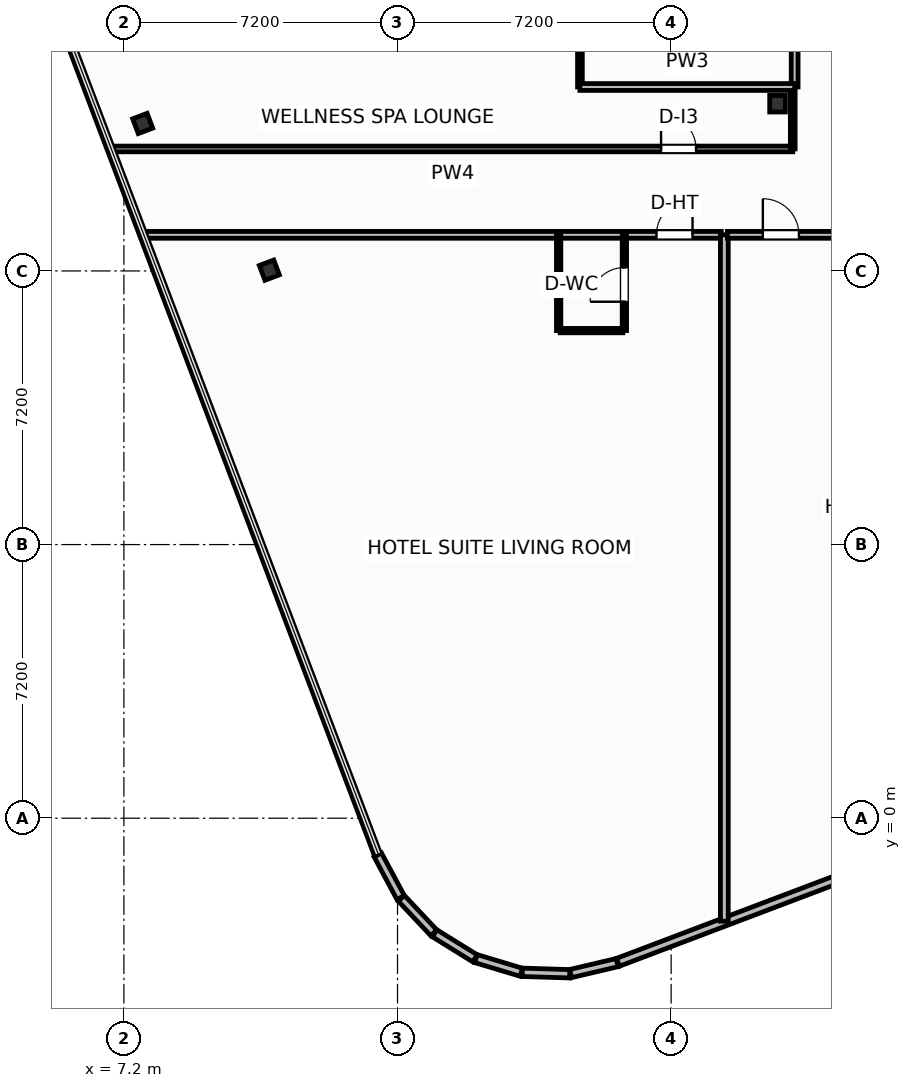
"""IFC4 building model, lengths in metres.
Left out: names, types, materials, properties, quantities, classifications, styles, units other than length and angle.
Written with IfcOpenShell. Run it as: python <this file> out.ifc"""

import sys

from ifc_helpers import new_model, si_unit, direction, frame, frame_2d, origin, origin_2d, place, context, subcontext, project, spatial, rectangle, i_section, extrude, element, fill, save


model = new_model("IFC4")
c1 = context("Model", 3, precision=1e-05, world=origin(), true_north=direction((0.0, 1.0)))
c2 = subcontext(c1, "Body", "Model", "MODEL_VIEW")
j1 = project(units=[si_unit("LENGTHUNIT", "METRE"), si_unit("PLANEANGLEUNIT", "RADIAN")], contexts=[c1])
p1 = place(None, origin())
s1 = spatial("IfcSite", under=j1, at=p1, CompositionType="ELEMENT")
p2 = place(p1, origin())
s2 = spatial("IfcBuilding", under=s1, at=p2, CompositionType="ELEMENT")
p3 = place(p2, frame((0.0, 0.0, 223.8)))
s3 = spatial("IfcBuildingStorey", under=s2, at=p3, CompositionType="ELEMENT", Elevation=223.8)
p4 = place(p3, frame((24.4, 18.8, 0.0), z_axis=(0.0, 0.0, 1.0), x_axis=(1.0, 0.0, 0.0)))
e1 = element("IfcColumn", 1, at=p4, inside=s3, PredefinedType="COLUMN", context=c2, shape_type="SweptSolid", body=[
    extrude(i_section(OverallWidth=0.412, OverallDepth=0.435, WebThickness=0.036, FlangeThickness=0.057, FilletRadius=0.025, at=origin_2d()), origin(), (0.0, 0.0, 1.0), 3.7),
])
for number, where, z_axis, x_axis in (
    (2, (7.695, 18.281, 0.0), (0.0, 0.0, 1.0), (0.935, 0.354, 0.0)),
    (3, (11.027, 14.42, 0.0), (0.0, 0.0, 1.0), (0.935, 0.354, 0.0)),
):
    element("IfcColumn", number, at=place(p3, frame(where, z_axis=z_axis, x_axis=x_axis)), inside=s3, PredefinedType="COLUMN", context=c2, shape_type="SweptSolid", body=[
        extrude(i_section(OverallWidth=0.406, OverallDepth=0.416, WebThickness=0.03, FlangeThickness=0.048, FilletRadius=0.025, at=origin_2d()), origin(), (0.0, 0.0, 1.0), 3.7),
    ])
p5 = place(p3, frame((13.881, -0.966, 0.0), z_axis=(0.0, 0.0, 1.0), x_axis=(0.473242342135, -0.88093228208, 0.0)))
e4 = element("IfcWall", 4, at=p5, inside=s3, PredefinedType="SOLIDWALL", context=c2, shape_type="SweptSolid", body=[
    extrude(rectangle(XDim=1.274, YDim=0.22, at=frame_2d((0.637, 0.0))), origin(), (0.0, 0.0, 1.0), 2.73),
])
for number, where, z_axis, x_axis in (
    (5, (14.5, -2.106, 0.0), (0.0, 0.0, 1.0), (0.685, -0.729, 0.0)),
    (6, (15.377, -3.029, 0.0), (0.0, 0.0, 1.0), (0.85, -0.526, 0.0)),
    (7, (16.463, -3.694, 0.0), (0.0, 0.0, 1.0), (0.958, -0.288, 0.0)),
):
    element("IfcWall", number, at=place(p3, frame(where, z_axis=z_axis, x_axis=x_axis)), inside=s3, PredefinedType="SOLIDWALL", context=c2, shape_type="SweptSolid", body=[
        extrude(rectangle(XDim=1.249, YDim=0.22, at=frame_2d((0.624, 0.0))), origin(), (0.0, 0.0, 1.0), 2.73),
    ])
p6 = place(p3, frame((17.683, -4.055, 0.0), z_axis=(0.0, 0.0, 1.0), x_axis=(0.999522886512, -0.030886879732, 0.0)))
e8 = element("IfcWall", 8, at=p6, inside=s3, PredefinedType="SOLIDWALL", context=c2, shape_type="SweptSolid", body=[
    extrude(rectangle(XDim=1.249, YDim=0.22, at=frame_2d((0.625, 0.0))), origin(), (0.0, 0.0, 1.0), 2.73),
])
p7 = place(p3, frame((18.956, -4.087, 0.0), z_axis=(0.0, 0.0, 1.0), x_axis=(0.973463008152, 0.228844426981, 0.0)))
e9 = element("IfcWall", 9, at=p7, inside=s3, PredefinedType="SOLIDWALL", context=c2, shape_type="SweptSolid", body=[
    extrude(rectangle(XDim=1.257, YDim=0.22, at=frame_2d((0.628, 0.0))), origin(), (0.0, 0.0, 1.0), 2.73),
])
p8 = place(p3, frame((20.202, -3.791, 0.0), z_axis=(0.0, 0.0, 1.0), x_axis=(0.935225574232, 0.354052432984, 0.0)))
e10 = element("IfcWall", 10, at=p8, inside=s3, PredefinedType="SOLIDWALL", context=c2, shape_type="SweptSolid", body=[
    extrude(rectangle(XDim=17.747, YDim=0.22, at=frame_2d((8.874, 0.0))), origin(), (0.0, 0.0, 1.0), 2.73),
])
p9 = place(p8, frame((7.823, 0.0, 0.8)))
e11 = element("IfcOpeningElement", 11, at=p9, cuts=e10, PredefinedType="OPENING", context=c2, shape_type="SweptSolid", body=[
    extrude(rectangle(XDim=2.1, YDim=1.75, at=frame_2d((1.05, 0.875))), frame((0.0, 0.12, 0.0), z_axis=(0.0, -1.0, 0.0), x_axis=(1.0, 0.0, 0.0)), (0.0, 0.0, 1.0), 0.24),
])
p10 = place(p3, frame((6.908, 17.61, 0.0), z_axis=(0.0, 0.0, 1.0), x_axis=(1.0, 0.0, 0.0)))
e12 = element("IfcWall", 12, at=p10, inside=s3, PredefinedType="PARTITIONING", context=c2, shape_type="SweptSolid", body=[
    extrude(rectangle(XDim=17.892, YDim=0.15, at=frame_2d((8.946, 0.0))), origin(), (0.0, 0.0, 1.0), 3.45),
])
p11 = place(p10, frame((14.427, 0.0, 0.0)))
e13 = element("IfcOpeningElement", 13, at=p11, cuts=e12, PredefinedType="OPENING", context=c2, shape_type="SweptSolid", body=[
    extrude(rectangle(XDim=0.92, YDim=2.05, at=frame_2d((0.46, 1.025))), frame((0.0, 0.085, 0.0), z_axis=(0.0, -1.0, 0.0), x_axis=(1.0, 0.0, 0.0)), (0.0, 0.0, 1.0), 0.17),
])
p12 = place(p3, frame((24.8, 17.61, 0.0), z_axis=(0.0, 0.0, 1.0), x_axis=(0.0, 1.0, 0.0)))
e14 = element("IfcWall", 14, at=p12, inside=s3, PredefinedType="PARTITIONING", context=c2, shape_type="SweptSolid", body=[
    extrude(rectangle(XDim=1.63, YDim=0.125, at=frame_2d((0.815, 0.0))), origin(), (0.0, 0.0, 1.0), 2.739),
])
p13 = place(p3, frame((7.764, 15.35, 0.0), z_axis=(0.0, 0.0, 1.0), x_axis=(1.0, 0.0, 0.0)))
e15 = element("IfcWall", 15, at=p13, inside=s3, PredefinedType="PARTITIONING", context=c2, shape_type="SweptSolid", body=[
    extrude(rectangle(XDim=15.156, YDim=0.18, at=frame_2d((7.578, 0.0))), origin(), (0.0, 0.0, 1.0), 3.45),
])
p14 = place(p13, frame((13.45, 0.0, 0.0)))
e16 = element("IfcOpeningElement", 16, at=p14, cuts=e15, PredefinedType="OPENING", context=c2, shape_type="SweptSolid", body=[
    extrude(rectangle(XDim=0.95, YDim=2.15, at=frame_2d((0.475, 1.075))), frame((0.0, 0.1, 0.0), z_axis=(0.0, -1.0, 0.0), x_axis=(1.0, 0.0, 0.0)), (0.0, 0.0, 1.0), 0.2),
])
p15 = place(p3, frame((18.68, 12.83, 0.0), z_axis=(0.0, 0.0, 1.0), x_axis=(1.0, 0.0, 0.0)))
e17 = element("IfcWall", 17, at=p15, inside=s3, PredefinedType="PARTITIONING", context=c2, shape_type="SweptSolid", body=[
    extrude(rectangle(XDim=1.65, YDim=0.115, at=frame_2d((0.825, 0.0))), origin(), (0.0, 0.0, 1.0), 3.45),
])
p16 = place(p3, frame((20.37, 12.83, 0.0), z_axis=(0.0, 0.0, 1.0), x_axis=(0.0, 1.0, 0.0)))
e18 = element("IfcWall", 18, at=p16, inside=s3, PredefinedType="PARTITIONING", context=c2, shape_type="SweptSolid", body=[
    extrude(rectangle(XDim=2.52, YDim=0.115, at=frame_2d((1.26, 0.0))), origin(), (0.0, 0.0, 1.0), 3.45),
])
p17 = place(p16, frame((0.76, 0.0, 0.0)))
e19 = element("IfcOpeningElement", 19, at=p17, cuts=e18, PredefinedType="OPENING", context=c2, shape_type="SweptSolid", body=[
    extrude(rectangle(XDim=0.9, YDim=2.05, at=frame_2d((0.45, 1.025))), frame((0.0, 0.067, 0.0), z_axis=(0.0, -1.0, 0.0), x_axis=(1.0, 0.0, 0.0)), (0.0, 0.0, 1.0), 0.135),
])
p18 = place(p3, frame((18.64, 12.83, 0.0), z_axis=(0.0, 0.0, 1.0), x_axis=(0.0, 1.0, 0.0)))
e20 = element("IfcWall", 20, at=p18, inside=s3, PredefinedType="PARTITIONING", context=c2, shape_type="SweptSolid", body=[
    extrude(rectangle(XDim=2.52, YDim=0.115, at=frame_2d((1.26, 0.0))), origin(), (0.0, 0.0, 1.0), 3.45),
])
p19 = place(p3, frame((23.0, -2.71, 0.0), z_axis=(0.0, 0.0, 1.0), x_axis=(0.0, 1.0, 0.0)))
e21 = element("IfcWall", 21, at=p19, inside=s3, PredefinedType="PARTITIONING", context=c2, shape_type="SweptSolid", body=[
    extrude(rectangle(XDim=18.06, YDim=0.205, at=frame_2d((9.03, 0.0))), origin(), (0.0, 0.0, 1.0), 3.45),
])
p20 = place(p3, frame((23.08, 15.35, 0.0), z_axis=(0.0, 0.0, 1.0), x_axis=(1.0, 0.0, 0.0)))
e22 = element("IfcWall", 22, at=p20, inside=s3, PredefinedType="PARTITIONING", context=c2, shape_type="SweptSolid", body=[
    extrude(rectangle(XDim=12.34, YDim=0.18, at=frame_2d((6.17, 0.0))), origin(), (0.0, 0.0, 1.0), 3.45),
])
p21 = place(p20, frame((0.933, 0.0, 0.0)))
e23 = element("IfcOpeningElement", 23, at=p21, cuts=e22, PredefinedType="OPENING", context=c2, shape_type="SweptSolid", body=[
    extrude(rectangle(XDim=0.95, YDim=2.15, at=frame_2d((0.475, 1.075))), frame((0.0, 0.1, 0.0), z_axis=(0.0, -1.0, 0.0), x_axis=(1.0, 0.0, 0.0)), (0.0, 0.0, 1.0), 0.2),
])
p22 = place(p3, frame((24.85, 19.24, 0.0), z_axis=(0.0, 0.0, 1.0), x_axis=(0.0, 1.0, 0.0)))
e24 = element("IfcWall", 24, at=p22, inside=s3, PredefinedType="PARTITIONING", context=c2, shape_type="SweptSolid", body=[
    extrude(rectangle(XDim=7.42, YDim=0.18, at=frame_2d((3.71, 0.0))), origin(), (0.0, 0.0, 1.0), 3.45),
])
p23 = place(p22, frame((2.4, 0.0, 0.0)))
e25 = element("IfcOpeningElement", 25, at=p23, cuts=e24, PredefinedType="OPENING", context=c2, shape_type="SweptSolid", body=[
    extrude(rectangle(XDim=0.92, YDim=2.05, at=frame_2d((0.46, 1.025))), frame((0.0, 0.1, 0.0), z_axis=(0.0, -1.0, 0.0), x_axis=(1.0, 0.0, 0.0)), (0.0, 0.0, 1.0), 0.2),
])
p24 = place(p3, frame((19.2, 19.24, 0.0), z_axis=(0.0, 0.0, 1.0), x_axis=(0.0, 1.0, 0.0)))
e26 = element("IfcWall", 26, at=p24, inside=s3, PredefinedType="PARTITIONING", context=c2, shape_type="SweptSolid", body=[
    extrude(rectangle(XDim=7.42, YDim=0.125, at=frame_2d((3.71, 0.0))), origin(), (0.0, 0.0, 1.0), 3.45),
])
p25 = place(p3, frame((19.2, 19.24, 0.0), z_axis=(0.0, 0.0, 1.0), x_axis=(1.0, 0.0, 0.0)))
e27 = element("IfcWall", 27, at=p25, inside=s3, PredefinedType="PARTITIONING", context=c2, shape_type="SweptSolid", body=[
    extrude(rectangle(XDim=5.65, YDim=0.18, at=frame_2d((2.825, 0.0))), origin(), (0.0, 0.0, 1.0), 3.45),
])
p26 = place(p11, origin())
e28 = element("IfcDoor", 28, at=p26, inside=s3, OperationType="SINGLE_SWING_LEFT", PredefinedType="DOOR", context=c2, shape_type="SweptSolid", body=[
    extrude(rectangle(XDim=0.92, YDim=2.05, at=frame_2d((0.46, 1.025))), frame((0.0, 0.025, 0.0), z_axis=(0.0, -1.0, 0.0), x_axis=(1.0, 0.0, 0.0)), (0.0, 0.0, 1.0), 0.05),
])
fill(e13, e28)
p27 = place(p14, origin())
e29 = element("IfcDoor", 29, at=p27, inside=s3, OperationType="SINGLE_SWING_RIGHT", PredefinedType="DOOR", context=c2, shape_type="SweptSolid", body=[
    extrude(rectangle(XDim=0.95, YDim=2.15, at=frame_2d((0.475, 1.075))), frame((0.0, 0.025, 0.0), z_axis=(0.0, -1.0, 0.0), x_axis=(1.0, 0.0, 0.0)), (0.0, 0.0, 1.0), 0.05),
])
fill(e16, e29)
p28 = place(p17, origin())
e30 = element("IfcDoor", 30, at=p28, inside=s3, OperationType="SINGLE_SWING_LEFT", PredefinedType="DOOR", context=c2, shape_type="SweptSolid", body=[
    extrude(rectangle(XDim=0.9, YDim=2.05, at=frame_2d((0.45, 1.025))), frame((0.0, 0.025, 0.0), z_axis=(0.0, -1.0, 0.0), x_axis=(1.0, 0.0, 0.0)), (0.0, 0.0, 1.0), 0.05),
])
fill(e19, e30)
p29 = place(p21, origin())
e31 = element("IfcDoor", 31, at=p29, inside=s3, OperationType="SINGLE_SWING_LEFT", PredefinedType="DOOR", context=c2, shape_type="SweptSolid", body=[
    extrude(rectangle(XDim=0.95, YDim=2.15, at=frame_2d((0.475, 1.075))), frame((0.0, 0.025, 0.0), z_axis=(0.0, -1.0, 0.0), x_axis=(1.0, 0.0, 0.0)), (0.0, 0.0, 1.0), 0.05),
])
fill(e23, e31)
save(model, sys.argv[1])
